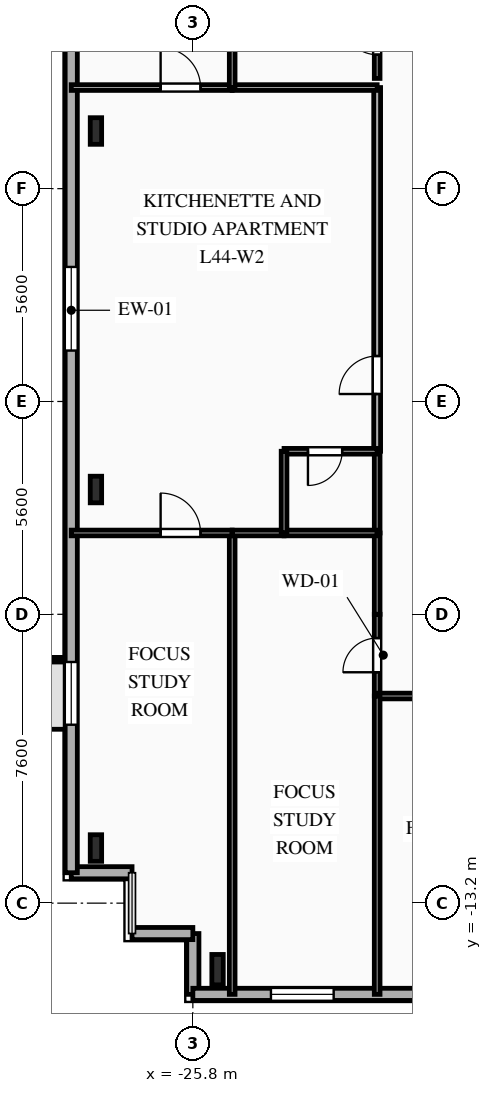
"""IFC4 building model, lengths in metres.
Left out: names, types, materials, properties, quantities, classifications, styles, units other than length and angle.
Written with IfcOpenShell. Run it as: python <this file> out.ifc"""

import sys

from ifc_helpers import new_model, si_unit, direction, frame, frame_2d, origin, origin_2d, place, context, subcontext, project, spatial, rectangle, i_section, extrude, element, fill, save


model = new_model("IFC4")
c1 = context("Model", 3, precision=1e-05, world=origin(), true_north=direction((0.0, 1.0)))
c2 = subcontext(c1, "Body", "Model", "MODEL_VIEW")
j1 = project(units=[si_unit("LENGTHUNIT", "METRE"), si_unit("PLANEANGLEUNIT", "RADIAN")], contexts=[c1])
p1 = place(None, origin())
s1 = spatial("IfcSite", under=j1, at=p1, CompositionType="ELEMENT")
p2 = place(p1, origin())
s2 = spatial("IfcBuilding", under=s1, at=p2, CompositionType="ELEMENT")
p3 = place(p2, frame((0.0, 0.0, 157.8)))
s3 = spatial("IfcBuildingStorey", under=s2, at=p3, CompositionType="ELEMENT", Elevation=157.8)
p4 = place(p3, frame((-25.15, -14.95, 0.0), z_axis=(0.0, 0.0, 1.0), x_axis=(1.0, 0.0, 0.0)))
e1 = element("IfcColumn", 1, at=p4, inside=s3, PredefinedType="COLUMN", context=c2, shape_type="SweptSolid", body=[
    extrude(i_section(OverallWidth=0.3, OverallDepth=0.8, WebThickness=0.018, FlangeThickness=0.033, FilletRadius=0.03, at=origin_2d()), origin(), (0.0, 0.0, 1.0), 3.35),
])
for number, where, z_axis, x_axis in (
    (2, (-28.35, 7.117, 0.0), (0.0, 0.0, 1.0), (1.0, 0.0, 0.0)),
    (3, (-28.35, -2.317, 0.0), (0.0, 0.0, 1.0), (1.0, 0.0, 0.0)),
    (4, (-28.35, -11.75, 0.0), (0.0, 0.0, 1.0), (1.0, 0.0, 0.0)),
):
    element("IfcColumn", number, at=place(p3, frame(where, z_axis=z_axis, x_axis=x_axis)), inside=s3, PredefinedType="COLUMN", context=c2, shape_type="SweptSolid", body=[
        extrude(i_section(OverallWidth=0.3, OverallDepth=0.7, WebThickness=0.017, FlangeThickness=0.032, FilletRadius=0.027, at=origin_2d()), origin(), (0.0, 0.0, 1.0), 3.35),
    ])
p5 = place(p3, frame((-25.8, -15.6, 0.0), z_axis=(0.0, 0.0, 1.0), x_axis=(0.0, 1.0, 0.0)))
e5 = element("IfcWall", 5, at=p5, inside=s3, PredefinedType="SOLIDWALL", context=c2, shape_type="SweptSolid", body=[
    extrude(rectangle(XDim=1.6, YDim=0.32, at=frame_2d((0.8, 0.0))), origin(), (0.0, 0.0, 1.0), 3.04),
])
p6 = place(p3, frame((-25.8, -14.0, 0.0), z_axis=(0.0, 0.0, 1.0), x_axis=(-1.0, 0.0, 0.0)))
e6 = element("IfcWall", 6, at=p6, inside=s3, PredefinedType="SOLIDWALL", context=c2, shape_type="SweptSolid", body=[
    extrude(rectangle(XDim=1.6, YDim=0.32, at=frame_2d((0.8, 0.0))), origin(), (0.0, 0.0, 1.0), 3.04),
])
p7 = place(p3, frame((-27.4, -12.4, 0.0), z_axis=(0.0, 0.0, 1.0), x_axis=(-1.0, 0.0, 0.0)))
e7 = element("IfcWall", 7, at=p7, inside=s3, PredefinedType="SOLIDWALL", context=c2, shape_type="SweptSolid", body=[
    extrude(rectangle(XDim=1.6, YDim=0.32, at=frame_2d((0.8, 0.0))), origin(), (0.0, 0.0, 1.0), 3.04),
])
p8 = place(p3, frame((-29.0, -12.4, 0.0), z_axis=(0.0, 0.0, 1.0), x_axis=(0.0, 1.0, 0.0)))
e8 = element("IfcWall", 8, at=p8, inside=s3, PredefinedType="SOLIDWALL", context=c2, shape_type="SweptSolid", body=[
    extrude(rectangle(XDim=29.6, YDim=0.32, at=frame_2d((14.8, 0.0))), origin(), (0.0, 0.0, 1.0), 3.04),
])
p9 = place(p8, frame((3.895, 0.0, 0.85)))
e9 = element("IfcOpeningElement", 9, at=p9, cuts=e8, PredefinedType="OPENING", context=c2, shape_type="SweptSolid", body=[
    extrude(rectangle(XDim=1.65, YDim=1.85, at=frame_2d((0.825, 0.925))), frame((0.0, 0.17, 0.0), z_axis=(0.0, -1.0, 0.0), x_axis=(1.0, 0.0, 0.0)), (0.0, 0.0, 1.0), 0.34),
])
p10 = place(p8, frame((13.74, 0.0, 0.85)))
e10 = element("IfcOpeningElement", 10, at=p10, cuts=e8, PredefinedType="OPENING", context=c2, shape_type="SweptSolid", body=[
    extrude(rectangle(XDim=2.2, YDim=1.85, at=frame_2d((1.1, 0.925))), frame((0.0, 0.17, 0.0), z_axis=(0.0, -1.0, 0.0), x_axis=(1.0, 0.0, 0.0)), (0.0, 0.0, 1.0), 0.34),
])
p11 = place(p8, frame((24.135, 0.0, 0.85)))
e11 = element("IfcOpeningElement", 11, at=p11, cuts=e8, PredefinedType="OPENING", context=c2, shape_type="SweptSolid", body=[
    extrude(rectangle(XDim=1.65, YDim=1.85, at=frame_2d((0.825, 0.925))), frame((0.0, 0.17, 0.0), z_axis=(0.0, -1.0, 0.0), x_axis=(1.0, 0.0, 0.0)), (0.0, 0.0, 1.0), 0.34),
])
p12 = place(p3, frame((23.8, -15.6, 0.0), z_axis=(0.0, 0.0, 1.0), x_axis=(-1.0, 0.0, 0.0)))
e12 = element("IfcWall", 12, at=p12, inside=s3, PredefinedType="SOLIDWALL", context=c2, shape_type="SweptSolid", body=[
    extrude(rectangle(XDim=49.6, YDim=0.32, at=frame_2d((24.8, 0.0))), origin(), (0.0, 0.0, 1.0), 3.04),
])
p13 = place(p12, frame((1.13, 0.0, 0.85)))
e13 = element("IfcOpeningElement", 13, at=p13, cuts=e12, PredefinedType="OPENING", context=c2, shape_type="SweptSolid", body=[
    extrude(rectangle(XDim=1.1, YDim=1.85, at=frame_2d((0.55, 0.925))), frame((0.0, 0.17, 0.0), z_axis=(0.0, -1.0, 0.0), x_axis=(1.0, 0.0, 0.0)), (0.0, 0.0, 1.0), 0.34),
])
p14 = place(p12, frame((5.295, 0.0, 0.85)))
e14 = element("IfcOpeningElement", 14, at=p14, cuts=e12, PredefinedType="OPENING", context=c2, shape_type="SweptSolid", body=[
    extrude(rectangle(XDim=1.65, YDim=1.85, at=frame_2d((0.825, 0.925))), frame((0.0, 0.17, 0.0), z_axis=(0.0, -1.0, 0.0), x_axis=(1.0, 0.0, 0.0)), (0.0, 0.0, 1.0), 0.34),
])
p15 = place(p12, frame((11.74, 0.0, 0.85)))
e15 = element("IfcOpeningElement", 15, at=p15, cuts=e12, PredefinedType="OPENING", context=c2, shape_type="SweptSolid", body=[
    extrude(rectangle(XDim=2.2, YDim=1.85, at=frame_2d((1.1, 0.925))), frame((0.0, 0.17, 0.0), z_axis=(0.0, -1.0, 0.0), x_axis=(1.0, 0.0, 0.0)), (0.0, 0.0, 1.0), 0.34),
])
p16 = place(p12, frame((18.74, 0.0, 0.85)))
e16 = element("IfcOpeningElement", 16, at=p16, cuts=e12, PredefinedType="OPENING", context=c2, shape_type="SweptSolid", body=[
    extrude(rectangle(XDim=2.2, YDim=1.85, at=frame_2d((1.1, 0.925))), frame((0.0, 0.17, 0.0), z_axis=(0.0, -1.0, 0.0), x_axis=(1.0, 0.0, 0.0)), (0.0, 0.0, 1.0), 0.34),
])
p17 = place(p12, frame((25.74, 0.0, 0.85)))
e17 = element("IfcOpeningElement", 17, at=p17, cuts=e12, PredefinedType="OPENING", context=c2, shape_type="SweptSolid", body=[
    extrude(rectangle(XDim=2.2, YDim=1.85, at=frame_2d((1.1, 0.925))), frame((0.0, 0.17, 0.0), z_axis=(0.0, -1.0, 0.0), x_axis=(1.0, 0.0, 0.0)), (0.0, 0.0, 1.0), 0.34),
])
p18 = place(p12, frame((33.348, 0.0, 0.85)))
e18 = element("IfcOpeningElement", 18, at=p18, cuts=e12, PredefinedType="OPENING", context=c2, shape_type="SweptSolid", body=[
    extrude(rectangle(XDim=2.2, YDim=1.85, at=frame_2d((1.1, 0.925))), frame((0.0, 0.17, 0.0), z_axis=(0.0, -1.0, 0.0), x_axis=(1.0, 0.0, 0.0)), (0.0, 0.0, 1.0), 0.34),
])
p19 = place(p12, frame((38.972, 0.0, 0.85)))
e19 = element("IfcOpeningElement", 19, at=p19, cuts=e12, PredefinedType="OPENING", context=c2, shape_type="SweptSolid", body=[
    extrude(rectangle(XDim=1.65, YDim=1.85, at=frame_2d((0.825, 0.925))), frame((0.0, 0.17, 0.0), z_axis=(0.0, -1.0, 0.0), x_axis=(1.0, 0.0, 0.0)), (0.0, 0.0, 1.0), 0.34),
])
p20 = place(p12, frame((45.895, 0.0, 0.85)))
e20 = element("IfcOpeningElement", 20, at=p20, cuts=e12, PredefinedType="OPENING", context=c2, shape_type="SweptSolid", body=[
    extrude(rectangle(XDim=1.65, YDim=1.85, at=frame_2d((0.825, 0.925))), frame((0.0, 0.17, 0.0), z_axis=(0.0, -1.0, 0.0), x_axis=(1.0, 0.0, 0.0)), (0.0, 0.0, 1.0), 0.34),
])
p21 = place(p3, frame((-20.95, 8.5, 0.0), z_axis=(0.0, 0.0, 1.0), x_axis=(0.0, 1.0, 0.0)))
e21 = element("IfcWall", 21, at=p21, inside=s3, PredefinedType="PARTITIONING", context=c2, shape_type="SweptSolid", body=[
    extrude(rectangle(XDim=2.15, YDim=0.15, at=frame_2d((1.075, 0.0))), origin(), (0.0, 0.0, 1.0), 3.04),
])
p22 = place(p21, frame((0.625, 0.0, 0.0)))
e22 = element("IfcOpeningElement", 22, at=p22, cuts=e21, PredefinedType="OPENING", context=c2, shape_type="SweptSolid", body=[
    extrude(rectangle(XDim=0.9, YDim=2.1, at=frame_2d((0.45, 1.05))), frame((0.0, 0.085, 0.0), z_axis=(0.0, -1.0, 0.0), x_axis=(1.0, 0.0, 0.0)), (0.0, 0.0, 1.0), 0.17),
])
p23 = place(p3, frame((-20.95, -7.75, 0.0), z_axis=(0.0, 0.0, 1.0), x_axis=(0.0, 1.0, 0.0)))
e23 = element("IfcWall", 23, at=p23, inside=s3, PredefinedType="PARTITIONING", context=c2, shape_type="SweptSolid", body=[
    extrude(rectangle(XDim=2.15, YDim=0.15, at=frame_2d((1.075, 0.0))), origin(), (0.0, 0.0, 1.0), 3.04),
])
p24 = place(p23, frame((0.625, 0.0, 0.0)))
e24 = element("IfcOpeningElement", 24, at=p24, cuts=e23, PredefinedType="OPENING", context=c2, shape_type="SweptSolid", body=[
    extrude(rectangle(XDim=0.9, YDim=2.1, at=frame_2d((0.45, 1.05))), frame((0.0, 0.085, 0.0), z_axis=(0.0, -1.0, 0.0), x_axis=(1.0, 0.0, 0.0)), (0.0, 0.0, 1.0), 0.17),
])
p25 = place(p3, frame((-13.467, -7.75, 0.0), z_axis=(0.0, 0.0, 1.0), x_axis=(-1.0, 0.0, 0.0)))
e25 = element("IfcWall", 25, at=p25, inside=s3, PredefinedType="PARTITIONING", context=c2, shape_type="SweptSolid", body=[
    extrude(rectangle(XDim=7.483, YDim=0.15, at=frame_2d((3.741, 0.0))), origin(), (0.0, 0.0, 1.0), 3.04),
])
p26 = place(p25, frame((1.239, 0.0, 0.0)))
e26 = element("IfcOpeningElement", 26, at=p26, cuts=e25, PredefinedType="OPENING", context=c2, shape_type="SweptSolid", body=[
    extrude(rectangle(XDim=1.05, YDim=2.15, at=frame_2d((0.525, 1.075))), frame((0.0, 0.085, 0.0), z_axis=(0.0, -1.0, 0.0), x_axis=(1.0, 0.0, 0.0)), (0.0, 0.0, 1.0), 0.17),
])
p27 = place(p3, frame((-20.95, -5.6, 0.0), z_axis=(0.0, 0.0, 1.0), x_axis=(0.0, 1.0, 0.0)))
e27 = element("IfcWall", 27, at=p27, inside=s3, PredefinedType="PARTITIONING", context=c2, shape_type="SweptSolid", body=[
    extrude(rectangle(XDim=2.14, YDim=0.15, at=frame_2d((1.07, 0.0))), origin(), (0.0, 0.0, 1.0), 3.04),
])
p28 = place(p3, frame((-20.95, -1.31, 0.0), z_axis=(0.0, 0.0, 1.0), x_axis=(0.0, 1.0, 0.0)))
e28 = element("IfcWall", 28, at=p28, inside=s3, PredefinedType="PARTITIONING", context=c2, shape_type="SweptSolid", body=[
    extrude(rectangle(XDim=9.57, YDim=0.18, at=frame_2d((4.785, 0.0))), origin(), (0.0, 0.0, 1.0), 3.04),
])
p29 = place(p28, frame((1.506, 0.0, 0.0)))
e29 = element("IfcOpeningElement", 29, at=p29, cuts=e28, PredefinedType="OPENING", context=c2, shape_type="SweptSolid", body=[
    extrude(rectangle(XDim=1.0, YDim=2.15, at=frame_2d((0.5, 1.075))), frame((0.0, 0.1, 0.0), z_axis=(0.0, -1.0, 0.0), x_axis=(1.0, 0.0, 0.0)), (0.0, 0.0, 1.0), 0.2),
])
p30 = place(p3, frame((-20.95, -3.46, 0.0), z_axis=(0.0, 0.0, 1.0), x_axis=(0.0, 1.0, 0.0)))
e30 = element("IfcWall", 30, at=p30, inside=s3, PredefinedType="PLUMBINGWALL", context=c2, shape_type="SweptSolid", body=[
    extrude(rectangle(XDim=2.15, YDim=0.15, at=frame_2d((1.075, 0.0))), origin(), (0.0, 0.0, 1.0), 3.04),
])
p31 = place(p3, frame((-24.765, -3.46, 0.0), z_axis=(0.0, 0.0, 1.0), x_axis=(0.0, -1.0, 0.0)))
e31 = element("IfcWall", 31, at=p31, inside=s3, PredefinedType="PARTITIONING", context=c2, shape_type="SweptSolid", body=[
    extrude(rectangle(XDim=12.14, YDim=0.15, at=frame_2d((6.07, 0.0))), origin(), (0.0, 0.0, 1.0), 3.04),
])
p32 = place(p3, frame((-29.0, -3.46, 0.0), z_axis=(0.0, 0.0, 1.0), x_axis=(1.0, 0.0, 0.0)))
e32 = element("IfcWall", 32, at=p32, inside=s3, PredefinedType="PARTITIONING", context=c2, shape_type="SweptSolid", body=[
    extrude(rectangle(XDim=4.235, YDim=0.15, at=frame_2d((2.118, 0.0))), origin(), (0.0, 0.0, 1.0), 3.04),
])
p33 = place(p32, frame((2.352, 0.0, 0.0)))
e33 = element("IfcOpeningElement", 33, at=p33, cuts=e32, PredefinedType="OPENING", context=c2, shape_type="SweptSolid", body=[
    extrude(rectangle(XDim=1.05, YDim=2.15, at=frame_2d((0.525, 1.075))), frame((0.0, 0.085, 0.0), z_axis=(0.0, -1.0, 0.0), x_axis=(1.0, 0.0, 0.0)), (0.0, 0.0, 1.0), 0.17),
])
p34 = place(p3, frame((-24.765, -3.46, 0.0), z_axis=(0.0, 0.0, 1.0), x_axis=(1.0, 0.0, 0.0)))
e34 = element("IfcWall", 34, at=p34, inside=s3, PredefinedType="PARTITIONING", context=c2, shape_type="SweptSolid", body=[
    extrude(rectangle(XDim=1.365, YDim=0.15, at=frame_2d((0.683, 0.0))), origin(), (0.0, 0.0, 1.0), 3.04),
])
p35 = place(p3, frame((-23.4, -3.46, 0.0), z_axis=(0.0, 0.0, 1.0), x_axis=(1.0, 0.0, 0.0)))
e35 = element("IfcWall", 35, at=p35, inside=s3, PredefinedType="PLUMBINGWALL", context=c2, shape_type="SweptSolid", body=[
    extrude(rectangle(XDim=2.45, YDim=0.15, at=frame_2d((1.225, 0.0))), origin(), (0.0, 0.0, 1.0), 3.04),
])
p36 = place(p3, frame((-20.95, -7.75, 0.0), z_axis=(0.0, 0.0, 1.0), x_axis=(0.0, -1.0, 0.0)))
e36 = element("IfcWall", 36, at=p36, inside=s3, PredefinedType="PARTITIONING", context=c2, shape_type="SweptSolid", body=[
    extrude(rectangle(XDim=7.85, YDim=0.15, at=frame_2d((3.925, 0.0))), origin(), (0.0, 0.0, 1.0), 3.04),
])
p37 = place(p3, frame((-20.95, -1.31, 0.0), z_axis=(0.0, 0.0, 1.0), x_axis=(-1.0, 0.0, 0.0)))
e37 = element("IfcWall", 37, at=p37, inside=s3, PredefinedType="PLUMBINGWALL", context=c2, shape_type="SweptSolid", body=[
    extrude(rectangle(XDim=2.45, YDim=0.15, at=frame_2d((1.225, 0.0))), origin(), (0.0, 0.0, 1.0), 3.04),
])
p38 = place(p37, frame((0.921, 0.0, 0.0)))
e38 = element("IfcOpeningElement", 38, at=p38, cuts=e37, PredefinedType="OPENING", context=c2, shape_type="SweptSolid", body=[
    extrude(rectangle(XDim=0.9, YDim=2.1, at=frame_2d((0.45, 1.05))), frame((0.0, 0.085, 0.0), z_axis=(0.0, -1.0, 0.0), x_axis=(1.0, 0.0, 0.0)), (0.0, 0.0, 1.0), 0.17),
])
p39 = place(p3, frame((-23.4, -1.31, 0.0), z_axis=(0.0, 0.0, 1.0), x_axis=(0.0, -1.0, 0.0)))
e39 = element("IfcWall", 39, at=p39, inside=s3, PredefinedType="PLUMBINGWALL", context=c2, shape_type="SweptSolid", body=[
    extrude(rectangle(XDim=2.15, YDim=0.15, at=frame_2d((1.075, 0.0))), origin(), (0.0, 0.0, 1.0), 3.04),
])
p40 = place(p3, frame((-29.0, 8.26, 0.0), z_axis=(0.0, 0.0, 1.0), x_axis=(1.0, 0.0, 0.0)))
e40 = element("IfcWall", 40, at=p40, inside=s3, PredefinedType="PARTITIONING", context=c2, shape_type="SweptSolid", body=[
    extrude(rectangle(XDim=4.235, YDim=0.15, at=frame_2d((2.118, 0.0))), origin(), (0.0, 0.0, 1.0), 3.04),
])
p41 = place(p40, frame((2.352, 0.0, 0.0)))
e41 = element("IfcOpeningElement", 41, at=p41, cuts=e40, PredefinedType="OPENING", context=c2, shape_type="SweptSolid", body=[
    extrude(rectangle(XDim=1.05, YDim=2.15, at=frame_2d((0.525, 1.075))), frame((0.0, 0.085, 0.0), z_axis=(0.0, -1.0, 0.0), x_axis=(1.0, 0.0, 0.0)), (0.0, 0.0, 1.0), 0.17),
])
p42 = place(p3, frame((-24.765, 8.26, 0.0), z_axis=(0.0, 0.0, 1.0), x_axis=(1.0, 0.0, 0.0)))
e42 = element("IfcWall", 42, at=p42, inside=s3, PredefinedType="PARTITIONING", context=c2, shape_type="SweptSolid", body=[
    extrude(rectangle(XDim=3.815, YDim=0.15, at=frame_2d((1.907, 0.0))), origin(), (0.0, 0.0, 1.0), 3.04),
])
p43 = place(p3, frame((-24.765, 20.4, 0.0), z_axis=(0.0, 0.0, 1.0), x_axis=(0.0, -1.0, 0.0)))
e43 = element("IfcWall", 43, at=p43, inside=s3, PredefinedType="PARTITIONING", context=c2, shape_type="SweptSolid", body=[
    extrude(rectangle(XDim=12.14, YDim=0.15, at=frame_2d((6.07, 0.0))), origin(), (0.0, 0.0, 1.0), 3.04),
])
p44 = place(p9, origin())
e44 = element("IfcWindow", 44, at=p44, inside=s3, PartitioningType="SINGLE_PANEL", PredefinedType="WINDOW", context=c2, shape_type="SweptSolid", body=[
    extrude(rectangle(XDim=1.65, YDim=1.85, at=frame_2d((0.825, 0.925))), frame((0.0, 0.03, 0.0), z_axis=(0.0, -1.0, 0.0), x_axis=(1.0, 0.0, 0.0)), (0.0, 0.0, 1.0), 0.06),
])
fill(e9, e44)
p45 = place(p10, origin())
e45 = element("IfcWindow", 45, at=p45, inside=s3, PartitioningType="SINGLE_PANEL", PredefinedType="WINDOW", context=c2, shape_type="SweptSolid", body=[
    extrude(rectangle(XDim=2.2, YDim=1.85, at=frame_2d((1.1, 0.925))), frame((0.0, 0.03, 0.0), z_axis=(0.0, -1.0, 0.0), x_axis=(1.0, 0.0, 0.0)), (0.0, 0.0, 1.0), 0.06),
])
fill(e10, e45)
p46 = place(p20, origin())
e46 = element("IfcWindow", 46, at=p46, inside=s3, PartitioningType="SINGLE_PANEL", PredefinedType="WINDOW", context=c2, shape_type="SweptSolid", body=[
    extrude(rectangle(XDim=1.65, YDim=1.85, at=frame_2d((0.825, 0.925))), frame((0.0, 0.03, 0.0), z_axis=(0.0, -1.0, 0.0), x_axis=(1.0, 0.0, 0.0)), (0.0, 0.0, 1.0), 0.06),
])
fill(e20, e46)
p47 = place(p22, origin())
e47 = element("IfcDoor", 47, at=p47, inside=s3, OperationType="SINGLE_SWING_RIGHT", PredefinedType="DOOR", context=c2, shape_type="SweptSolid", body=[
    extrude(rectangle(XDim=0.9, YDim=2.1, at=frame_2d((0.45, 1.05))), frame((0.0, 0.025, 0.0), z_axis=(0.0, -1.0, 0.0), x_axis=(1.0, 0.0, 0.0)), (0.0, 0.0, 1.0), 0.05),
])
fill(e22, e47)
p48 = place(p24, origin())
e48 = element("IfcDoor", 48, at=p48, inside=s3, OperationType="SINGLE_SWING_LEFT", PredefinedType="DOOR", context=c2, shape_type="SweptSolid", body=[
    extrude(rectangle(XDim=0.9, YDim=2.1, at=frame_2d((0.45, 1.05))), frame((0.0, 0.025, 0.0), z_axis=(0.0, -1.0, 0.0), x_axis=(1.0, 0.0, 0.0)), (0.0, 0.0, 1.0), 0.05),
])
fill(e24, e48)
p49 = place(p29, origin())
e49 = element("IfcDoor", 49, at=p49, inside=s3, OperationType="SINGLE_SWING_LEFT", PredefinedType="DOOR", context=c2, shape_type="SweptSolid", body=[
    extrude(rectangle(XDim=1.0, YDim=2.15, at=frame_2d((0.5, 1.075))), frame((0.0, 0.025, 0.0), z_axis=(0.0, -1.0, 0.0), x_axis=(1.0, 0.0, 0.0)), (0.0, 0.0, 1.0), 0.05),
])
fill(e29, e49)
p50 = place(p33, origin())
e50 = element("IfcDoor", 50, at=p50, inside=s3, OperationType="SINGLE_SWING_LEFT", PredefinedType="DOOR", context=c2, shape_type="SweptSolid", body=[
    extrude(rectangle(XDim=1.05, YDim=2.15, at=frame_2d((0.525, 1.075))), frame((0.0, 0.025, 0.0), z_axis=(0.0, -1.0, 0.0), x_axis=(1.0, 0.0, 0.0)), (0.0, 0.0, 1.0), 0.05),
])
fill(e33, e50)
p51 = place(p38, origin())
e51 = element("IfcDoor", 51, at=p51, inside=s3, OperationType="SINGLE_SWING_RIGHT", PredefinedType="DOOR", context=c2, shape_type="SweptSolid", body=[
    extrude(rectangle(XDim=0.9, YDim=2.1, at=frame_2d((0.45, 1.05))), frame((0.0, 0.025, 0.0), z_axis=(0.0, -1.0, 0.0), x_axis=(1.0, 0.0, 0.0)), (0.0, 0.0, 1.0), 0.05),
])
fill(e38, e51)
p52 = place(p41, origin())
e52 = element("IfcDoor", 52, at=p52, inside=s3, OperationType="SINGLE_SWING_LEFT", PredefinedType="DOOR", context=c2, shape_type="SweptSolid", body=[
    extrude(rectangle(XDim=1.05, YDim=2.15, at=frame_2d((0.525, 1.075))), frame((0.0, 0.025, 0.0), z_axis=(0.0, -1.0, 0.0), x_axis=(1.0, 0.0, 0.0)), (0.0, 0.0, 1.0), 0.05),
])
fill(e41, e52)
save(model, sys.argv[1])
